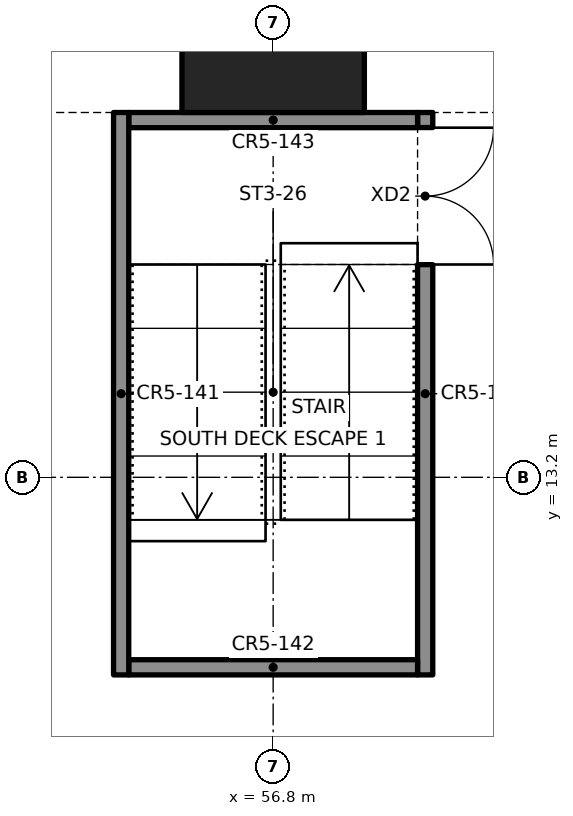
"""IFC4 building model, lengths in metres.
Left out: names, types, materials, properties, quantities, classifications, styles, units other than length and angle.
Written with IfcOpenShell. Run it as: python <this file> out.ifc"""

import sys

from ifc_helpers import new_model, si_unit, direction, frame, frame_2d, origin, origin_2d, place, context, subcontext, project, spatial, rectangle, extrude, element, fill, save


model = new_model("IFC4")
c1 = context("Model", 3, precision=1e-05, world=origin(), true_north=direction((0.0, 1.0)))
c2 = subcontext(c1, "Body", "Model", "MODEL_VIEW")
j1 = project(units=[si_unit("LENGTHUNIT", "METRE"), si_unit("PLANEANGLEUNIT", "RADIAN")], contexts=[c1])
p1 = place(None, origin())
s1 = spatial("IfcSite", under=j1, at=p1, CompositionType="ELEMENT")
p2 = place(p1, origin())
s2 = spatial("IfcBuilding", under=s1, at=p2, CompositionType="ELEMENT")
p3 = place(p2, origin())
s3 = spatial("IfcBuildingStorey", under=s2, at=p3, CompositionType="ELEMENT", Elevation=0.0)
p4 = place(p3, frame((56.8, 19.2, -0.9), z_axis=(0.0, 0.0, 1.0), x_axis=(1.0, 0.0, 0.0)))
e1 = element("IfcColumn", 1, at=p4, inside=s3, PredefinedType="COLUMN", context=c2, shape_type="SweptSolid", body=[
    extrude(rectangle(XDim=2.4, YDim=2.4, at=origin_2d()), origin(), (0.0, 0.0, 1.0), 5.3),
])
p5 = place(p3, frame((54.8, 10.6, 0.0), z_axis=(0.0, 0.0, 1.0), x_axis=(0.0, 1.0, 0.0)))
e2 = element("IfcWall", 2, at=p5, inside=s3, PredefinedType="SOLIDWALL", context=c2, shape_type="SweptSolid", body=[
    extrude(rectangle(XDim=7.4, YDim=0.2, at=frame_2d((3.7, 0.0))), origin(), (0.0, 0.0, 1.0), 4.4),
])
p6 = place(p3, frame((58.8, 18.0, 0.0), z_axis=(0.0, 0.0, 1.0), x_axis=(0.0, -1.0, 0.0)))
e3 = element("IfcWall", 3, at=p6, inside=s3, PredefinedType="SOLIDWALL", context=c2, shape_type="SweptSolid", body=[
    extrude(rectangle(XDim=7.4, YDim=0.2, at=frame_2d((3.7, 0.0))), origin(), (0.0, 0.0, 1.0), 4.4),
])
p7 = place(p6, frame((0.2, 0.0, 0.0)))
e4 = element("IfcOpeningElement", 4, at=p7, cuts=e3, PredefinedType="OPENING", context=c2, shape_type="SweptSolid", body=[
    extrude(rectangle(XDim=1.8, YDim=2.1, at=frame_2d((0.9, 1.05))), frame((0.0, 0.11, 0.0), z_axis=(0.0, -1.0, 0.0), x_axis=(1.0, 0.0, 0.0)), (0.0, 0.0, 1.0), 0.22),
])
for number, where, z_axis, x_axis in (
    (5, (54.9, 10.7, 0.0), (0.0, 0.0, 1.0), (1.0, 0.0, 0.0)),
    (6, (54.9, 17.9, 0.0), (0.0, 0.0, 1.0), (1.0, 0.0, 0.0)),
):
    element("IfcWall", number, at=place(p3, frame(where, z_axis=z_axis, x_axis=x_axis)), inside=s3, PredefinedType="SOLIDWALL", context=c2, shape_type="SweptSolid", body=[
        extrude(rectangle(XDim=3.8, YDim=0.2, at=frame_2d((1.9, 0.0))), origin(), (0.0, 0.0, 1.0), 4.4),
    ])
p8 = place(p7, origin())
e7 = element("IfcDoor", 7, at=p8, inside=s3, OperationType="DOUBLE_DOOR_SINGLE_SWING", PredefinedType="DOOR", context=c2, shape_type="SweptSolid", body=[
    extrude(rectangle(XDim=1.8, YDim=2.1, at=frame_2d((0.9, 1.05))), frame((0.0, 0.025, 0.0), z_axis=(0.0, -1.0, 0.0), x_axis=(1.0, 0.0, 0.0)), (0.0, 0.0, 1.0), 0.05),
])
fill(e4, e7)
save(model, sys.argv[1])
